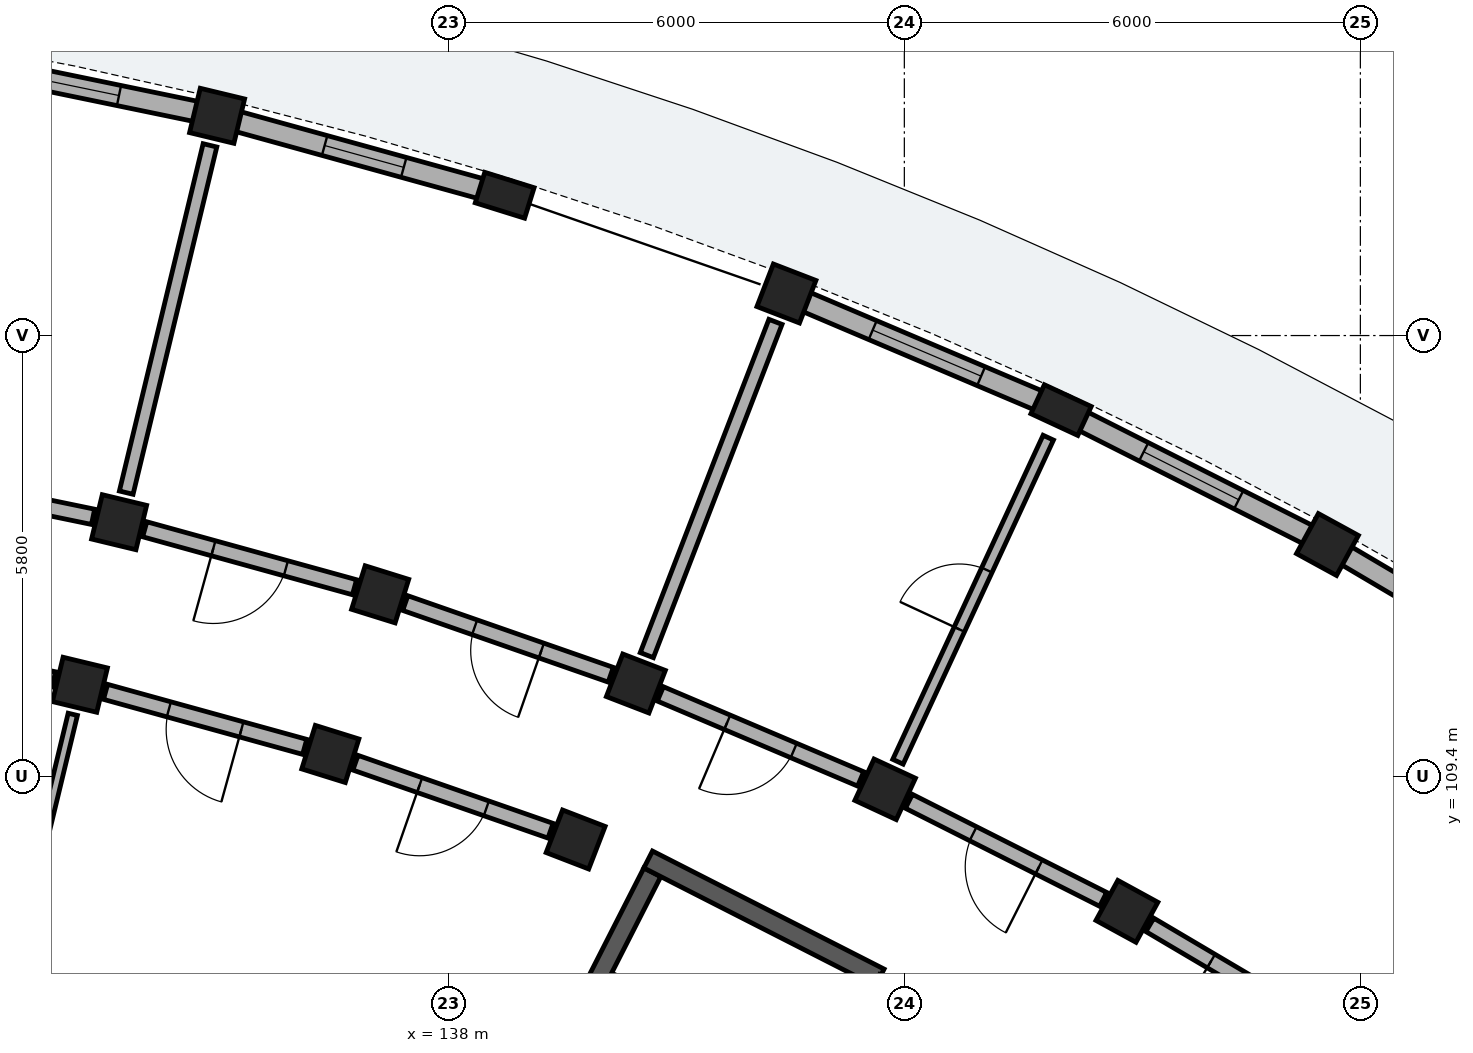
"""IFC4 building model, lengths in metres.
Left out: names, types, materials, properties, quantities, classifications, styles, units other than length and angle.
Written with IfcOpenShell. Run it as: python <this file> out.ifc"""

import sys

from ifc_helpers import new_model, si_unit, direction, frame, frame_2d, origin, origin_2d, place, context, subcontext, project, spatial, rectangle, extrude, element, fill, save


model = new_model("IFC4")
c1 = context("Model", 3, precision=1e-05, world=origin(), true_north=direction((0.0, 1.0)))
c2 = subcontext(c1, "Body", "Model", "MODEL_VIEW")
j1 = project(units=[si_unit("LENGTHUNIT", "METRE"), si_unit("PLANEANGLEUNIT", "RADIAN")], contexts=[c1])
p1 = place(None, origin())
s1 = spatial("IfcSite", under=j1, at=p1, CompositionType="ELEMENT")
p2 = place(p1, origin())
s2 = spatial("IfcBuilding", under=s1, at=p2, CompositionType="ELEMENT")
p3 = place(p2, origin())
s3 = spatial("IfcBuildingStorey", under=s2, at=p3, CompositionType="ELEMENT", Elevation=0.0)
p4 = place(p3, frame((140.684, 108.139, 0.0), z_axis=(0.0, 0.0, 1.0), x_axis=(-0.453992276384, -0.891005618941, 0.0)))
e1 = element("IfcWall", 1, at=p4, inside=s3, PredefinedType="SHEAR", context=c2, shape_type="SweptSolid", body=[
    extrude(rectangle(XDim=6.6, YDim=0.25, at=frame_2d((3.3, 0.0))), origin(), (0.0, 0.0, 1.0), 4.48),
])
p5 = place(p3, frame((140.629, 108.307, 0.0), z_axis=(0.0, 0.0, 1.0), x_axis=(0.891032414707, -0.453939683153, 0.0)))
e2 = element("IfcWall", 2, at=p5, inside=s3, PredefinedType="SHEAR", context=c2, shape_type="SweptSolid", body=[
    extrude(rectangle(XDim=3.42, YDim=0.25, at=frame_2d((1.71, 0.0))), origin(), (0.0, 0.0, 1.0), 4.48),
])
for number, where, z_axis, x_axis in (
    (3, (146.928, 107.625, 0.0), (0.0, 0.0, 1.0), (0.48, 0.877, 0.0)),
    (4, (149.567, 112.451, 0.0), (0.0, 0.0, 1.0), (0.48, 0.877, 0.0)),
    (5, (143.748, 109.23, 0.0), (0.0, 0.0, 1.0), (0.421, 0.907, 0.0)),
):
    element("IfcColumn", number, at=place(p3, frame(where, z_axis=z_axis, x_axis=x_axis)), inside=s3, PredefinedType="COLUMN", context=c2, shape_type="SweptSolid", body=[
        extrude(rectangle(XDim=0.6, YDim=0.6, at=origin_2d()), origin(), (0.0, 0.0, 1.0), 4.485),
    ])
p6 = place(p3, frame((146.062, 114.219, 0.0), z_axis=(0.0, 0.0, 1.0), x_axis=(0.420859860775, 0.907125668024, 0.0)))
e6 = element("IfcColumn", 6, at=p6, inside=s3, PredefinedType="PILASTER", context=c2, shape_type="SweptSolid", body=[
    extrude(rectangle(XDim=0.42, YDim=0.68, at=origin_2d()), origin(), (0.0, 0.0, 1.0), 4.485),
])
for number, where, z_axis, x_axis in (
    (7, (139.675, 108.57, 0.0), (0.0, 0.0, 1.0), (0.36, 0.933, 0.0)),
    (8, (140.468, 110.622, 0.0), (0.0, 0.0, 1.0), (0.36, 0.933, 0.0)),
    (9, (142.448, 115.753, 0.0), (0.0, 0.0, 1.0), (0.36, 0.933, 0.0)),
    (10, (136.448, 109.695, 0.0), (0.0, 0.0, 1.0), (0.298, 0.955, 0.0)),
    (11, (137.103, 111.795, 0.0), (0.0, 0.0, 1.0), (0.298, 0.955, 0.0)),
):
    element("IfcColumn", number, at=place(p3, frame(where, z_axis=z_axis, x_axis=x_axis)), inside=s3, PredefinedType="COLUMN", context=c2, shape_type="SweptSolid", body=[
        extrude(rectangle(XDim=0.6, YDim=0.6, at=origin_2d()), origin(), (0.0, 0.0, 1.0), 4.485),
    ])
p7 = place(p3, frame((138.742, 117.046, 0.0), z_axis=(0.0, 0.0, 1.0), x_axis=(0.297930225503, 0.954587649581, 0.0)))
e12 = element("IfcColumn", 12, at=p7, inside=s3, PredefinedType="PILASTER", context=c2, shape_type="SweptSolid", body=[
    extrude(rectangle(XDim=0.42, YDim=0.68, at=origin_2d()), origin(), (0.0, 0.0, 1.0), 4.485),
])
for number, where, z_axis, x_axis in (
    (13, (133.153, 110.606, 0.0), (0.0, 0.0, 1.0), (0.234, 0.972, 0.0)),
    (14, (133.669, 112.744, 0.0), (0.0, 0.0, 1.0), (0.234, 0.972, 0.0)),
    (15, (134.958, 118.091, 0.0), (0.0, 0.0, 1.0), (0.234, 0.972, 0.0)),
):
    element("IfcColumn", number, at=place(p3, frame(where, z_axis=z_axis, x_axis=x_axis)), inside=s3, PredefinedType="COLUMN", context=c2, shape_type="SweptSolid", body=[
        extrude(rectangle(XDim=0.6, YDim=0.6, at=origin_2d()), origin(), (0.0, 0.0, 1.0), 4.485),
    ])
p8 = place(p3, frame((152.792, 110.546, 0.0), z_axis=(0.0, 0.0, 1.0), x_axis=(-0.861127819205, 0.50838851186, 0.0)))
e16 = element("IfcWall", 16, at=p8, inside=s3, PredefinedType="SOLIDWALL", context=c2, shape_type="SweptSolid", body=[
    extrude(rectangle(XDim=3.476, YDim=0.27, at=frame_2d((1.738, 0.0))), origin(), (0.0, 0.0, 1.0), 3.755),
])
p9 = place(p8, frame((1.113, 0.0, 0.55)))
e17 = element("IfcOpeningElement", 17, at=p9, cuts=e16, PredefinedType="OPENING", context=c2, shape_type="SweptSolid", body=[
    extrude(rectangle(XDim=1.25, YDim=1.6, at=frame_2d((0.625, 0.8))), frame((0.0, 0.145, 0.0), z_axis=(0.0, -1.0, 0.0), x_axis=(1.0, 0.0, 0.0)), (0.0, 0.0, 1.0), 0.29),
])
p10 = place(p3, frame((149.326, 112.572, 0.0), z_axis=(0.0, 0.0, 1.0), x_axis=(-0.89276335836, 0.450525899333, 0.0)))
e18 = element("IfcWall", 18, at=p10, inside=s3, PredefinedType="SOLIDWALL", context=c2, shape_type="SweptSolid", body=[
    extrude(rectangle(XDim=3.476, YDim=0.27, at=frame_2d((1.738, 0.0))), origin(), (0.0, 0.0, 1.0), 3.755),
])
p11 = place(p10, frame((1.038, 0.0, 0.55)))
e19 = element("IfcOpeningElement", 19, at=p11, cuts=e18, PredefinedType="OPENING", context=c2, shape_type="SweptSolid", body=[
    extrude(rectangle(XDim=1.4, YDim=1.65, at=frame_2d((0.7, 0.825))), frame((0.0, 0.145, 0.0), z_axis=(0.0, -1.0, 0.0), x_axis=(1.0, 0.0, 0.0)), (0.0, 0.0, 1.0), 0.29),
])
p12 = place(p3, frame((145.896, 114.29, 0.0), z_axis=(0.0, 0.0, 1.0), x_axis=(-0.920498347177, 0.390746455959, 0.0)))
e20 = element("IfcWall", 20, at=p12, inside=s3, PredefinedType="SOLIDWALL", context=c2, shape_type="SweptSolid", body=[
    extrude(rectangle(XDim=3.476, YDim=0.27, at=frame_2d((1.738, 0.0))), origin(), (0.0, 0.0, 1.0), 3.755),
])
p13 = place(p12, frame((0.963, 0.0, 0.55)))
e21 = element("IfcOpeningElement", 21, at=p13, cuts=e20, PredefinedType="OPENING", context=c2, shape_type="SweptSolid", body=[
    extrude(rectangle(XDim=1.55, YDim=1.75, at=frame_2d((0.775, 0.875))), frame((0.0, 0.145, 0.0), z_axis=(0.0, -1.0, 0.0), x_axis=(1.0, 0.0, 0.0)), (0.0, 0.0, 1.0), 0.29),
])
p14 = place(p3, frame((138.568, 117.094, 0.0), z_axis=(0.0, 0.0, 1.0), x_axis=(-0.963896315356, 0.266277849706, 0.0)))
e22 = element("IfcWall", 22, at=p14, inside=s3, PredefinedType="SOLIDWALL", context=c2, shape_type="SweptSolid", body=[
    extrude(rectangle(XDim=3.476, YDim=0.27, at=frame_2d((1.738, 0.0))), origin(), (0.0, 0.0, 1.0), 3.755),
])
p15 = place(p14, frame((1.198, 0.0, 0.55)))
e23 = element("IfcOpeningElement", 23, at=p15, cuts=e22, PredefinedType="OPENING", context=c2, shape_type="SweptSolid", body=[
    extrude(rectangle(XDim=1.08, YDim=1.45, at=frame_2d((0.54, 0.725))), frame((0.0, 0.145, 0.0), z_axis=(0.0, -1.0, 0.0), x_axis=(1.0, 0.0, 0.0)), (0.0, 0.0, 1.0), 0.29),
])
p16 = place(p3, frame((134.693, 118.146, 0.0), z_axis=(0.0, 0.0, 1.0), x_axis=(-0.979337720299, 0.202231623637, 0.0)))
e24 = element("IfcWall", 24, at=p16, inside=s3, PredefinedType="SOLIDWALL", context=c2, shape_type="SweptSolid", body=[
    extrude(rectangle(XDim=3.476, YDim=0.27, at=frame_2d((1.738, 0.0))), origin(), (0.0, 0.0, 1.0), 3.755),
])
p17 = place(p16, frame((1.048, 0.0, 0.55)))
e25 = element("IfcOpeningElement", 25, at=p17, cuts=e24, PredefinedType="OPENING", context=c2, shape_type="SweptSolid", body=[
    extrude(rectangle(XDim=1.38, YDim=1.56, at=frame_2d((0.69, 0.78))), frame((0.0, 0.145, 0.0), z_axis=(0.0, -1.0, 0.0), x_axis=(1.0, 0.0, 0.0)), (0.0, 0.0, 1.0), 0.29),
])
p18 = place(p3, frame((150.211, 106.151, 0.0), z_axis=(0.0, 0.0, 1.0), x_axis=(0.536492262982, 0.843905238614, 0.0)))
e26 = element("IfcWall", 26, at=p18, inside=s3, PredefinedType="PARTITIONING", context=c2, shape_type="SweptSolid", body=[
    extrude(rectangle(XDim=4.7, YDim=0.125, at=frame_2d((2.35, 0.0))), origin(), (0.0, 0.0, 1.0), 3.1),
])
p19 = place(p18, frame((1.905, 0.0, 0.0)))
e27 = element("IfcOpeningElement", 27, at=p19, cuts=e26, PredefinedType="OPENING", context=c2, shape_type="SweptSolid", body=[
    extrude(rectangle(XDim=0.89, YDim=2.1, at=frame_2d((0.445, 1.05))), frame((0.0, 0.073, 0.0), z_axis=(0.0, -1.0, 0.0), x_axis=(1.0, 0.0, 0.0)), (0.0, 0.0, 1.0), 0.145),
])
p20 = place(p3, frame((149.695, 105.991, 0.0), z_axis=(0.0, 0.0, 1.0), x_axis=(-0.861113214678, 0.508413248753, 0.0)))
e28 = element("IfcWall", 28, at=p20, inside=s3, PredefinedType="PARTITIONING", context=c2, shape_type="SweptSolid", body=[
    extrude(rectangle(XDim=2.863, YDim=0.205, at=frame_2d((1.432, 0.0))), origin(), (0.0, 0.0, 1.0), 3.1),
])
p21 = place(p20, frame((0.937, 0.0, 0.0)))
e29 = element("IfcOpeningElement", 29, at=p21, cuts=e28, PredefinedType="OPENING", context=c2, shape_type="SweptSolid", body=[
    extrude(rectangle(XDim=0.99, YDim=2.16, at=frame_2d((0.495, 1.08))), frame((0.0, 0.113, 0.0), z_axis=(0.0, -1.0, 0.0), x_axis=(1.0, 0.0, 0.0)), (0.0, 0.0, 1.0), 0.225),
])
p22 = place(p3, frame((146.616, 107.782, 0.0), z_axis=(0.0, 0.0, 1.0), x_axis=(-0.89273239336, 0.450587254419, 0.0)))
e30 = element("IfcWall", 30, at=p22, inside=s3, PredefinedType="PARTITIONING", context=c2, shape_type="SweptSolid", body=[
    extrude(rectangle(XDim=2.863, YDim=0.205, at=frame_2d((1.432, 0.0))), origin(), (0.0, 0.0, 1.0), 3.1),
])
p23 = place(p22, frame((0.947, 0.0, 0.0)))
e31 = element("IfcOpeningElement", 31, at=p23, cuts=e30, PredefinedType="OPENING", context=c2, shape_type="SweptSolid", body=[
    extrude(rectangle(XDim=0.97, YDim=2.15, at=frame_2d((0.485, 1.075))), frame((0.0, 0.113, 0.0), z_axis=(0.0, -1.0, 0.0), x_axis=(1.0, 0.0, 0.0)), (0.0, 0.0, 1.0), 0.225),
])
p24 = place(p3, frame((143.916, 109.593, 0.0), z_axis=(0.0, 0.0, 1.0), x_axis=(0.420862519045, 0.907124434718, 0.0)))
e32 = element("IfcWall", 32, at=p24, inside=s3, PredefinedType="PLUMBINGWALL", context=c2, shape_type="SweptSolid", body=[
    extrude(rectangle(XDim=4.7, YDim=0.15, at=frame_2d((2.35, 0.0))), origin(), (0.0, 0.0, 1.0), 3.1),
])
p25 = place(p24, frame((1.92, 0.0, 0.0)))
e33 = element("IfcOpeningElement", 33, at=p25, cuts=e32, PredefinedType="OPENING", context=c2, shape_type="SweptSolid", body=[
    extrude(rectangle(XDim=0.86, YDim=2.06, at=frame_2d((0.43, 1.03))), frame((0.0, 0.085, 0.0), z_axis=(0.0, -1.0, 0.0), x_axis=(1.0, 0.0, 0.0)), (0.0, 0.0, 1.0), 0.17),
])
p26 = place(p3, frame((143.425, 109.367, 0.0), z_axis=(0.0, 0.0, 1.0), x_axis=(-0.920511160294, 0.390716270168, 0.0)))
e34 = element("IfcWall", 34, at=p26, inside=s3, PredefinedType="PARTITIONING", context=c2, shape_type="SweptSolid", body=[
    extrude(rectangle(XDim=2.863, YDim=0.205, at=frame_2d((1.432, 0.0))), origin(), (0.0, 0.0, 1.0), 3.1),
])
p27 = place(p26, frame((0.957, 0.0, 0.0)))
e35 = element("IfcOpeningElement", 35, at=p27, cuts=e34, PredefinedType="OPENING", context=c2, shape_type="SweptSolid", body=[
    extrude(rectangle(XDim=0.95, YDim=2.13, at=frame_2d((0.475, 1.065))), frame((0.0, 0.113, 0.0), z_axis=(0.0, -1.0, 0.0), x_axis=(1.0, 0.0, 0.0)), (0.0, 0.0, 1.0), 0.225),
])
p28 = place(p3, frame((140.612, 110.996, 0.0), z_axis=(0.0, 0.0, 1.0), x_axis=(0.360186633854, 0.932880264982, 0.0)))
e36 = element("IfcWall", 36, at=p28, inside=s3, PredefinedType="PARTITIONING", context=c2, shape_type="SweptSolid", body=[
    extrude(rectangle(XDim=4.7, YDim=0.185, at=frame_2d((2.35, 0.0))), origin(), (0.0, 0.0, 1.0), 3.1),
])
p29 = place(p3, frame((140.137, 110.738, 0.0), z_axis=(0.0, 0.0, 1.0), x_axis=(-0.944253820929, 0.329218349522, 0.0)))
e37 = element("IfcWall", 37, at=p29, inside=s3, PredefinedType="PARTITIONING", context=c2, shape_type="SweptSolid", body=[
    extrude(rectangle(XDim=2.863, YDim=0.205, at=frame_2d((1.432, 0.0))), origin(), (0.0, 0.0, 1.0), 3.1),
])
p30 = place(p29, frame((0.967, 0.0, 0.0)))
e38 = element("IfcOpeningElement", 38, at=p30, cuts=e37, PredefinedType="OPENING", context=c2, shape_type="SweptSolid", body=[
    extrude(rectangle(XDim=0.93, YDim=2.12, at=frame_2d((0.465, 1.06))), frame((0.0, 0.113, 0.0), z_axis=(0.0, -1.0, 0.0), x_axis=(1.0, 0.0, 0.0)), (0.0, 0.0, 1.0), 0.225),
])
p31 = place(p3, frame((139.345, 108.685, 0.0), z_axis=(0.0, 0.0, 1.0), x_axis=(-0.944265123647, 0.329185929627, 0.0)))
e39 = element("IfcWall", 39, at=p31, inside=s3, PredefinedType="PARTITIONING", context=c2, shape_type="SweptSolid", body=[
    extrude(rectangle(XDim=2.718, YDim=0.205, at=frame_2d((1.359, 0.0))), origin(), (0.0, 0.0, 1.0), 3.1),
])
p32 = place(p31, frame((0.894, 0.0, 0.0)))
e40 = element("IfcOpeningElement", 40, at=p32, cuts=e39, PredefinedType="OPENING", context=c2, shape_type="SweptSolid", body=[
    extrude(rectangle(XDim=0.93, YDim=2.12, at=frame_2d((0.465, 1.06))), frame((0.0, 0.113, 0.0), z_axis=(0.0, -1.0, 0.0), x_axis=(1.0, 0.0, 0.0)), (0.0, 0.0, 1.0), 0.225),
])
p33 = place(p3, frame((136.766, 111.889, 0.0), z_axis=(0.0, 0.0, 1.0), x_axis=(-0.963890789093, 0.266297853356, 0.0)))
e41 = element("IfcWall", 41, at=p33, inside=s3, PredefinedType="PARTITIONING", context=c2, shape_type="SweptSolid", body=[
    extrude(rectangle(XDim=2.863, YDim=0.205, at=frame_2d((1.432, 0.0))), origin(), (0.0, 0.0, 1.0), 3.1),
])
p34 = place(p33, frame((0.937, 0.0, 0.0)))
e42 = element("IfcOpeningElement", 42, at=p34, cuts=e41, PredefinedType="OPENING", context=c2, shape_type="SweptSolid", body=[
    extrude(rectangle(XDim=0.99, YDim=2.16, at=frame_2d((0.495, 1.08))), frame((0.0, 0.113, 0.0), z_axis=(0.0, -1.0, 0.0), x_axis=(1.0, 0.0, 0.0)), (0.0, 0.0, 1.0), 0.225),
])
p35 = place(p3, frame((136.11, 109.789, 0.0), z_axis=(0.0, 0.0, 1.0), x_axis=(-0.96388375821, 0.266323301006, 0.0)))
e43 = element("IfcWall", 43, at=p35, inside=s3, PredefinedType="PARTITIONING", context=c2, shape_type="SweptSolid", body=[
    extrude(rectangle(XDim=2.718, YDim=0.205, at=frame_2d((1.359, 0.0))), origin(), (0.0, 0.0, 1.0), 3.1),
])
p36 = place(p35, frame((0.864, 0.0, 0.0)))
e44 = element("IfcOpeningElement", 44, at=p36, cuts=e43, PredefinedType="OPENING", context=c2, shape_type="SweptSolid", body=[
    extrude(rectangle(XDim=0.99, YDim=2.16, at=frame_2d((0.495, 1.08))), frame((0.0, 0.113, 0.0), z_axis=(0.0, -1.0, 0.0), x_axis=(1.0, 0.0, 0.0)), (0.0, 0.0, 1.0), 0.225),
])
p37 = place(p3, frame((133.762, 113.133, 0.0), z_axis=(0.0, 0.0, 1.0), x_axis=(0.234386624934, 0.972143461662, 0.0)))
e45 = element("IfcWall", 45, at=p37, inside=s3, PredefinedType="PARTITIONING", context=c2, shape_type="SweptSolid", body=[
    extrude(rectangle(XDim=4.7, YDim=0.185, at=frame_2d((2.35, 0.0))), origin(), (0.0, 0.0, 1.0), 3.1),
])
p38 = place(p3, frame((131.512, 103.801, 0.0), z_axis=(0.0, 0.0, 1.0), x_axis=(0.234406698576, 0.972138621629, 0.0)))
e46 = element("IfcWall", 46, at=p38, inside=s3, PredefinedType="PARTITIONING", context=c2, shape_type="SweptSolid", body=[
    extrude(rectangle(XDim=6.6, YDim=0.125, at=frame_2d((3.3, 0.0))), origin(), (0.0, 0.0, 1.0), 3.1),
])
p39 = place(p38, frame((2.855, 0.0, 0.0)))
e47 = element("IfcOpeningElement", 47, at=p39, cuts=e46, PredefinedType="OPENING", context=c2, shape_type="SweptSolid", body=[
    extrude(rectangle(XDim=0.89, YDim=2.1, at=frame_2d((0.445, 1.05))), frame((0.0, 0.073, 0.0), z_axis=(0.0, -1.0, 0.0), x_axis=(1.0, 0.0, 0.0)), (0.0, 0.0, 1.0), 0.145),
])
p40 = place(p3, frame((133.326, 112.815, 0.0), z_axis=(0.0, 0.0, 1.0), x_axis=(-0.979348418612, 0.202179808492, 0.0)))
e48 = element("IfcWall", 48, at=p40, inside=s3, PredefinedType="PARTITIONING", context=c2, shape_type="SweptSolid", body=[
    extrude(rectangle(XDim=2.863, YDim=0.205, at=frame_2d((1.432, 0.0))), origin(), (0.0, 0.0, 1.0), 3.1),
])
p41 = place(p40, frame((0.947, 0.0, 0.0)))
e49 = element("IfcOpeningElement", 49, at=p41, cuts=e48, PredefinedType="OPENING", context=c2, shape_type="SweptSolid", body=[
    extrude(rectangle(XDim=0.97, YDim=2.15, at=frame_2d((0.485, 1.075))), frame((0.0, 0.113, 0.0), z_axis=(0.0, -1.0, 0.0), x_axis=(1.0, 0.0, 0.0)), (0.0, 0.0, 1.0), 0.225),
])
p42 = place(p3, frame((132.81, 110.677, 0.0), z_axis=(0.0, 0.0, 1.0), x_axis=(-0.979349423541, 0.202174940608, 0.0)))
e50 = element("IfcWall", 50, at=p42, inside=s3, PredefinedType="PARTITIONING", context=c2, shape_type="SweptSolid", body=[
    extrude(rectangle(XDim=2.718, YDim=0.205, at=frame_2d((1.359, 0.0))), origin(), (0.0, 0.0, 1.0), 3.1),
])
p43 = place(p42, frame((0.874, 0.0, 0.0)))
e51 = element("IfcOpeningElement", 51, at=p43, cuts=e50, PredefinedType="OPENING", context=c2, shape_type="SweptSolid", body=[
    extrude(rectangle(XDim=0.97, YDim=2.15, at=frame_2d((0.485, 1.075))), frame((0.0, 0.113, 0.0), z_axis=(0.0, -1.0, 0.0), x_axis=(1.0, 0.0, 0.0)), (0.0, 0.0, 1.0), 0.225),
])
p44 = place(p11, origin())
e52 = element("IfcWindow", 52, at=p44, inside=s3, PartitioningType="SINGLE_PANEL", PredefinedType="WINDOW", context=c2, shape_type="SweptSolid", body=[
    extrude(rectangle(XDim=1.4, YDim=1.65, at=frame_2d((0.7, 0.825))), frame((0.0, 0.03, 0.0), z_axis=(0.0, -1.0, 0.0), x_axis=(1.0, 0.0, 0.0)), (0.0, 0.0, 1.0), 0.06),
])
fill(e19, e52)
p45 = place(p13, origin())
e53 = element("IfcWindow", 53, at=p45, inside=s3, PartitioningType="SINGLE_PANEL", PredefinedType="WINDOW", context=c2, shape_type="SweptSolid", body=[
    extrude(rectangle(XDim=1.55, YDim=1.75, at=frame_2d((0.775, 0.875))), frame((0.0, 0.03, 0.0), z_axis=(0.0, -1.0, 0.0), x_axis=(1.0, 0.0, 0.0)), (0.0, 0.0, 1.0), 0.06),
])
fill(e21, e53)
p46 = place(p15, origin())
e54 = element("IfcWindow", 54, at=p46, inside=s3, PartitioningType="SINGLE_PANEL", PredefinedType="WINDOW", context=c2, shape_type="SweptSolid", body=[
    extrude(rectangle(XDim=1.08, YDim=1.45, at=frame_2d((0.54, 0.725))), frame((0.0, 0.03, 0.0), z_axis=(0.0, -1.0, 0.0), x_axis=(1.0, 0.0, 0.0)), (0.0, 0.0, 1.0), 0.06),
])
fill(e23, e54)
p47 = place(p17, origin())
e55 = element("IfcWindow", 55, at=p47, inside=s3, PartitioningType="SINGLE_PANEL", PredefinedType="WINDOW", context=c2, shape_type="SweptSolid", body=[
    extrude(rectangle(XDim=1.38, YDim=1.56, at=frame_2d((0.69, 0.78))), frame((0.0, 0.03, 0.0), z_axis=(0.0, -1.0, 0.0), x_axis=(1.0, 0.0, 0.0)), (0.0, 0.0, 1.0), 0.06),
])
fill(e25, e55)
p48 = place(p21, origin())
e56 = element("IfcDoor", 56, at=p48, inside=s3, OperationType="SINGLE_SWING_RIGHT", PredefinedType="DOOR", context=c2, shape_type="SweptSolid", body=[
    extrude(rectangle(XDim=0.99, YDim=2.16, at=frame_2d((0.495, 1.08))), frame((0.0, 0.025, 0.0), z_axis=(0.0, -1.0, 0.0), x_axis=(1.0, 0.0, 0.0)), (0.0, 0.0, 1.0), 0.05),
])
fill(e29, e56)
p49 = place(p23, origin())
e57 = element("IfcDoor", 57, at=p49, inside=s3, OperationType="SINGLE_SWING_LEFT", PredefinedType="DOOR", context=c2, shape_type="SweptSolid", body=[
    extrude(rectangle(XDim=0.97, YDim=2.15, at=frame_2d((0.485, 1.075))), frame((0.0, 0.025, 0.0), z_axis=(0.0, -1.0, 0.0), x_axis=(1.0, 0.0, 0.0)), (0.0, 0.0, 1.0), 0.05),
])
fill(e31, e57)
p50 = place(p25, origin())
e58 = element("IfcDoor", 58, at=p50, inside=s3, OperationType="SINGLE_SWING_LEFT", PredefinedType="DOOR", context=c2, shape_type="SweptSolid", body=[
    extrude(rectangle(XDim=0.86, YDim=2.06, at=frame_2d((0.43, 1.03))), frame((0.0, 0.025, 0.0), z_axis=(0.0, -1.0, 0.0), x_axis=(1.0, 0.0, 0.0)), (0.0, 0.0, 1.0), 0.05),
])
fill(e33, e58)
p51 = place(p27, origin())
e59 = element("IfcDoor", 59, at=p51, inside=s3, OperationType="SINGLE_SWING_RIGHT", PredefinedType="DOOR", context=c2, shape_type="SweptSolid", body=[
    extrude(rectangle(XDim=0.95, YDim=2.13, at=frame_2d((0.475, 1.065))), frame((0.0, 0.025, 0.0), z_axis=(0.0, -1.0, 0.0), x_axis=(1.0, 0.0, 0.0)), (0.0, 0.0, 1.0), 0.05),
])
fill(e35, e59)
p52 = place(p30, origin())
e60 = element("IfcDoor", 60, at=p52, inside=s3, OperationType="SINGLE_SWING_LEFT", PredefinedType="DOOR", context=c2, shape_type="SweptSolid", body=[
    extrude(rectangle(XDim=0.93, YDim=2.12, at=frame_2d((0.465, 1.06))), frame((0.0, 0.025, 0.0), z_axis=(0.0, -1.0, 0.0), x_axis=(1.0, 0.0, 0.0)), (0.0, 0.0, 1.0), 0.05),
])
fill(e38, e60)
p53 = place(p32, origin())
e61 = element("IfcDoor", 61, at=p53, inside=s3, OperationType="SINGLE_SWING_RIGHT", PredefinedType="DOOR", context=c2, shape_type="SweptSolid", body=[
    extrude(rectangle(XDim=0.93, YDim=2.12, at=frame_2d((0.465, 1.06))), frame((0.0, 0.025, 0.0), z_axis=(0.0, -1.0, 0.0), x_axis=(1.0, 0.0, 0.0)), (0.0, 0.0, 1.0), 0.05),
])
fill(e40, e61)
p54 = place(p34, origin())
e62 = element("IfcDoor", 62, at=p54, inside=s3, OperationType="SINGLE_SWING_RIGHT", PredefinedType="DOOR", context=c2, shape_type="SweptSolid", body=[
    extrude(rectangle(XDim=0.99, YDim=2.16, at=frame_2d((0.495, 1.08))), frame((0.0, 0.025, 0.0), z_axis=(0.0, -1.0, 0.0), x_axis=(1.0, 0.0, 0.0)), (0.0, 0.0, 1.0), 0.05),
])
fill(e42, e62)
p55 = place(p36, origin())
e63 = element("IfcDoor", 63, at=p55, inside=s3, OperationType="SINGLE_SWING_LEFT", PredefinedType="DOOR", context=c2, shape_type="SweptSolid", body=[
    extrude(rectangle(XDim=0.99, YDim=2.16, at=frame_2d((0.495, 1.08))), frame((0.0, 0.025, 0.0), z_axis=(0.0, -1.0, 0.0), x_axis=(1.0, 0.0, 0.0)), (0.0, 0.0, 1.0), 0.05),
])
fill(e44, e63)
save(model, sys.argv[1])
